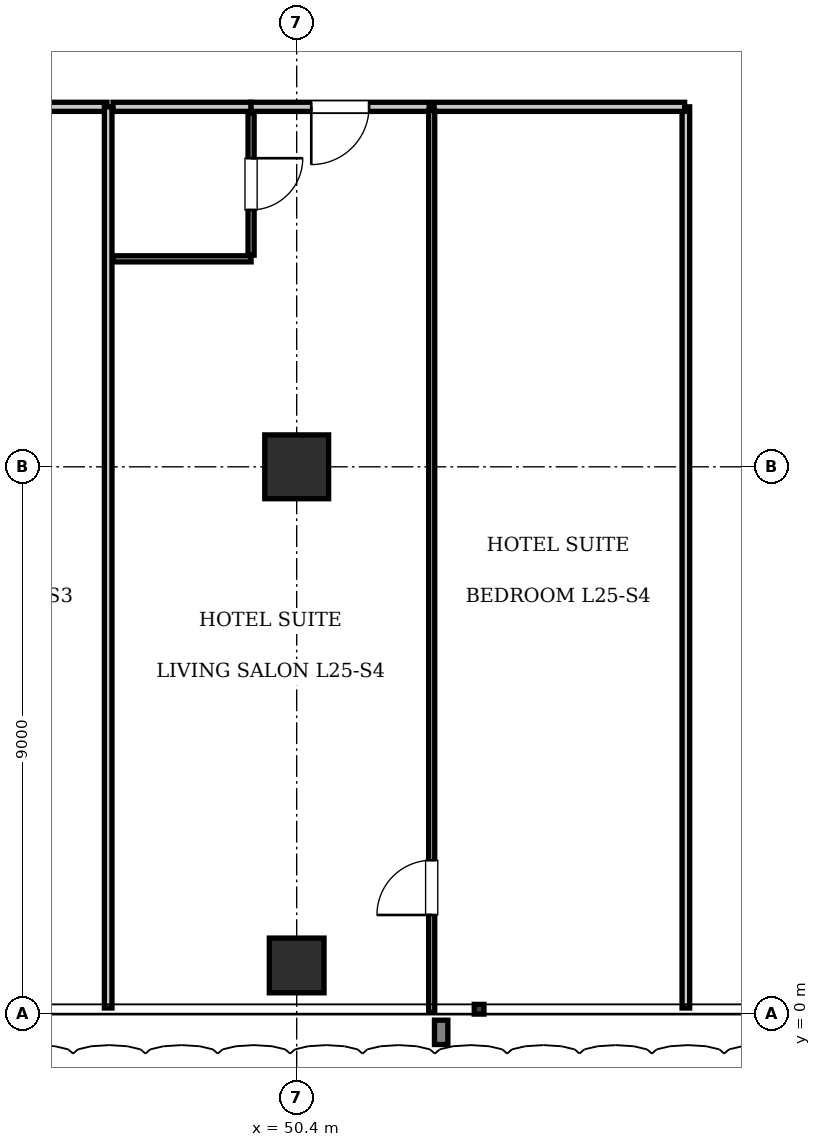
"""IFC4 building model, lengths in metres.
Left out: names, types, materials, properties, quantities, classifications, styles, units other than length and angle.
Written with IfcOpenShell. Run it as: python <this file> out.ifc"""

import sys

from ifc_helpers import new_model, si_unit, direction, frame, frame_2d, origin, origin_2d, place, context, subcontext, project, spatial, rectangle, extrude, element, fill, save


model = new_model("IFC4")
c1 = context("Model", 3, precision=1e-05, world=origin(), true_north=direction((0.0, 1.0)))
c2 = subcontext(c1, "Body", "Model", "MODEL_VIEW")
j1 = project(units=[si_unit("LENGTHUNIT", "METRE"), si_unit("PLANEANGLEUNIT", "RADIAN")], contexts=[c1])
p1 = place(None, origin())
s1 = spatial("IfcSite", under=j1, at=p1, CompositionType="ELEMENT")
p2 = place(p1, origin())
s2 = spatial("IfcBuilding", under=s1, at=p2, CompositionType="ELEMENT")
p3 = place(p2, frame((0.0, 0.0, 103.95)))
s3 = spatial("IfcBuildingStorey", under=s2, at=p3, CompositionType="ELEMENT", Elevation=103.95)
p4 = place(p3, frame((50.4, 9.0, 0.0), z_axis=(0.0, 0.0, 1.0), x_axis=(1.0, 0.0, 0.0)))
e1 = element("IfcColumn", 1, at=p4, inside=s3, PredefinedType="COLUMN", context=c2, shape_type="SweptSolid", body=[
    extrude(rectangle(XDim=1.05, YDim=1.05, at=origin_2d()), origin(), (0.0, 0.0, 1.0), 3.85),
])
p5 = place(p3, frame((50.4, 0.8, 0.0), z_axis=(0.0, 0.0, 1.0), x_axis=(1.0, 0.0, 0.0)))
e2 = element("IfcColumn", 2, at=p5, inside=s3, PredefinedType="COLUMN", context=c2, shape_type="SweptSolid", body=[
    extrude(rectangle(XDim=0.9, YDim=0.9, at=origin_2d()), origin(), (0.0, 0.0, 1.0), 3.85),
])
p6 = place(p3, frame((56.8, 0.1, 0.0), z_axis=(0.0, 0.0, 1.0), x_axis=(0.0, 1.0, 0.0)))
e3 = element("IfcWall", 3, at=p6, inside=s3, PredefinedType="PARTITIONING", context=c2, shape_type="SweptSolid", body=[
    extrude(rectangle(XDim=14.82, YDim=0.125, at=frame_2d((7.41, 0.0))), origin(), (0.0, 0.0, 1.0), 3.61),
])
p7 = place(p3, frame((43.16, 14.92, 0.0), z_axis=(0.0, 0.0, 1.0), x_axis=(1.0, 0.0, 0.0)))
e4 = element("IfcWall", 4, at=p7, inside=s3, PredefinedType="PARTITIONING", context=c2, shape_type="SweptSolid", body=[
    extrude(rectangle(XDim=4.12, YDim=0.15, at=frame_2d((2.06, 0.0))), origin(), (0.0, 0.0, 1.0), 3.61),
])
p8 = place(p3, frame((47.3, 0.1, 0.0), z_axis=(0.0, 0.0, 1.0), x_axis=(0.0, 1.0, 0.0)))
e5 = element("IfcWall", 5, at=p8, inside=s3, PredefinedType="PARTITIONING", context=c2, shape_type="SweptSolid", body=[
    extrude(rectangle(XDim=14.82, YDim=0.125, at=frame_2d((7.41, 0.0))), origin(), (0.0, 0.0, 1.0), 3.61),
])
p9 = place(p3, frame((47.38, 14.92, 0.0), z_axis=(0.0, 0.0, 1.0), x_axis=(1.0, 0.0, 0.0)))
e6 = element("IfcWall", 6, at=p9, inside=s3, PredefinedType="PARTITIONING", context=c2, shape_type="SweptSolid", body=[
    extrude(rectangle(XDim=2.27, YDim=0.15, at=frame_2d((1.135, 0.0))), origin(), (0.0, 0.0, 1.0), 3.61),
])
p10 = place(p3, frame((47.38, 12.42, 0.0), z_axis=(0.0, 0.0, 1.0), x_axis=(1.0, 0.0, 0.0)))
e7 = element("IfcWall", 7, at=p10, inside=s3, PredefinedType="PARTITIONING", context=c2, shape_type="SweptSolid", body=[
    extrude(rectangle(XDim=2.27, YDim=0.1, at=frame_2d((1.135, 0.0))), origin(), (0.0, 0.0, 1.0), 3.61),
])
p11 = place(p3, frame((49.65, 12.48, 0.0), z_axis=(0.0, 0.0, 1.0), x_axis=(0.0, 1.0, 0.0)))
e8 = element("IfcWall", 8, at=p11, inside=s3, PredefinedType="PARTITIONING", context=c2, shape_type="SweptSolid", body=[
    extrude(rectangle(XDim=2.34, YDim=0.1, at=frame_2d((1.17, 0.0))), origin(), (0.0, 0.0, 1.0), 3.61),
])
p12 = place(p11, frame((0.745, 0.0, 0.0)))
e9 = element("IfcOpeningElement", 9, at=p12, cuts=e8, PredefinedType="OPENING", context=c2, shape_type="SweptSolid", body=[
    extrude(rectangle(XDim=0.85, YDim=2.1, at=frame_2d((0.425, 1.05))), frame((0.0, 0.06, 0.0), z_axis=(0.0, -1.0, 0.0), x_axis=(1.0, 0.0, 0.0)), (0.0, 0.0, 1.0), 0.12),
])
p13 = place(p3, frame((49.65, 14.92, 0.0), z_axis=(0.0, 0.0, 1.0), x_axis=(1.0, 0.0, 0.0)))
e10 = element("IfcWall", 10, at=p13, inside=s3, PredefinedType="PARTITIONING", context=c2, shape_type="SweptSolid", body=[
    extrude(rectangle(XDim=2.93, YDim=0.15, at=frame_2d((1.465, 0.0))), origin(), (0.0, 0.0, 1.0), 3.61),
])
p14 = place(p13, frame((0.99, 0.0, 0.0)))
e11 = element("IfcOpeningElement", 11, at=p14, cuts=e10, PredefinedType="OPENING", context=c2, shape_type="SweptSolid", body=[
    extrude(rectangle(XDim=0.95, YDim=2.15, at=frame_2d((0.475, 1.075))), frame((0.0, 0.085, 0.0), z_axis=(0.0, -1.0, 0.0), x_axis=(1.0, 0.0, 0.0)), (0.0, 0.0, 1.0), 0.17),
])
p15 = place(p3, frame((52.66, 14.92, 0.0), z_axis=(0.0, 0.0, 1.0), x_axis=(1.0, 0.0, 0.0)))
e12 = element("IfcWall", 12, at=p15, inside=s3, PredefinedType="PARTITIONING", context=c2, shape_type="SweptSolid", body=[
    extrude(rectangle(XDim=4.12, YDim=0.15, at=frame_2d((2.06, 0.0))), origin(), (0.0, 0.0, 1.0), 3.61),
])
p16 = place(p3, frame((52.62, 0.03, 0.0), z_axis=(0.0, 0.0, 1.0), x_axis=(0.0, 1.0, 0.0)))
e13 = element("IfcWall", 13, at=p16, inside=s3, PredefinedType="PARTITIONING", context=c2, shape_type="SweptSolid", body=[
    extrude(rectangle(XDim=14.83, YDim=0.1, at=frame_2d((7.415, 0.0))), origin(), (0.0, 0.0, 1.0), 3.61),
])
p17 = place(p16, frame((1.6, 0.0, 0.0)))
e14 = element("IfcOpeningElement", 14, at=p17, cuts=e13, PredefinedType="OPENING", context=c2, shape_type="SweptSolid", body=[
    extrude(rectangle(XDim=0.9, YDim=2.1, at=frame_2d((0.45, 1.05))), frame((0.0, 0.06, 0.0), z_axis=(0.0, -1.0, 0.0), x_axis=(1.0, 0.0, 0.0)), (0.0, 0.0, 1.0), 0.12),
])
p18 = place(p12, frame((0.85, 0.0, 0.0), z_axis=(0.0, 0.0, 1.0), x_axis=(-1.0, 0.0, 0.0)))
e15 = element("IfcDoor", 15, at=p18, inside=s3, OperationType="SINGLE_SWING_LEFT", PredefinedType="DOOR", context=c2, shape_type="SweptSolid", body=[
    extrude(rectangle(XDim=0.85, YDim=2.1, at=frame_2d((0.425, 1.05))), frame((0.0, 0.025, 0.0), z_axis=(0.0, -1.0, 0.0), x_axis=(1.0, 0.0, 0.0)), (0.0, 0.0, 1.0), 0.05),
])
fill(e9, e15)
p19 = place(p14, frame((0.95, 0.0, 0.0), z_axis=(0.0, 0.0, 1.0), x_axis=(-1.0, 0.0, 0.0)))
e16 = element("IfcDoor", 16, at=p19, inside=s3, OperationType="SINGLE_SWING_RIGHT", PredefinedType="DOOR", context=c2, shape_type="SweptSolid", body=[
    extrude(rectangle(XDim=0.95, YDim=2.15, at=frame_2d((0.475, 1.075))), frame((0.0, 0.025, 0.0), z_axis=(0.0, -1.0, 0.0), x_axis=(1.0, 0.0, 0.0)), (0.0, 0.0, 1.0), 0.05),
])
fill(e11, e16)
p20 = place(p17, origin())
e17 = element("IfcDoor", 17, at=p20, inside=s3, OperationType="SINGLE_SWING_LEFT", PredefinedType="DOOR", context=c2, shape_type="SweptSolid", body=[
    extrude(rectangle(XDim=0.9, YDim=2.1, at=frame_2d((0.45, 1.05))), frame((0.0, 0.025, 0.0), z_axis=(0.0, -1.0, 0.0), x_axis=(1.0, 0.0, 0.0)), (0.0, 0.0, 1.0), 0.05),
])
fill(e14, e17)
save(model, sys.argv[1])
